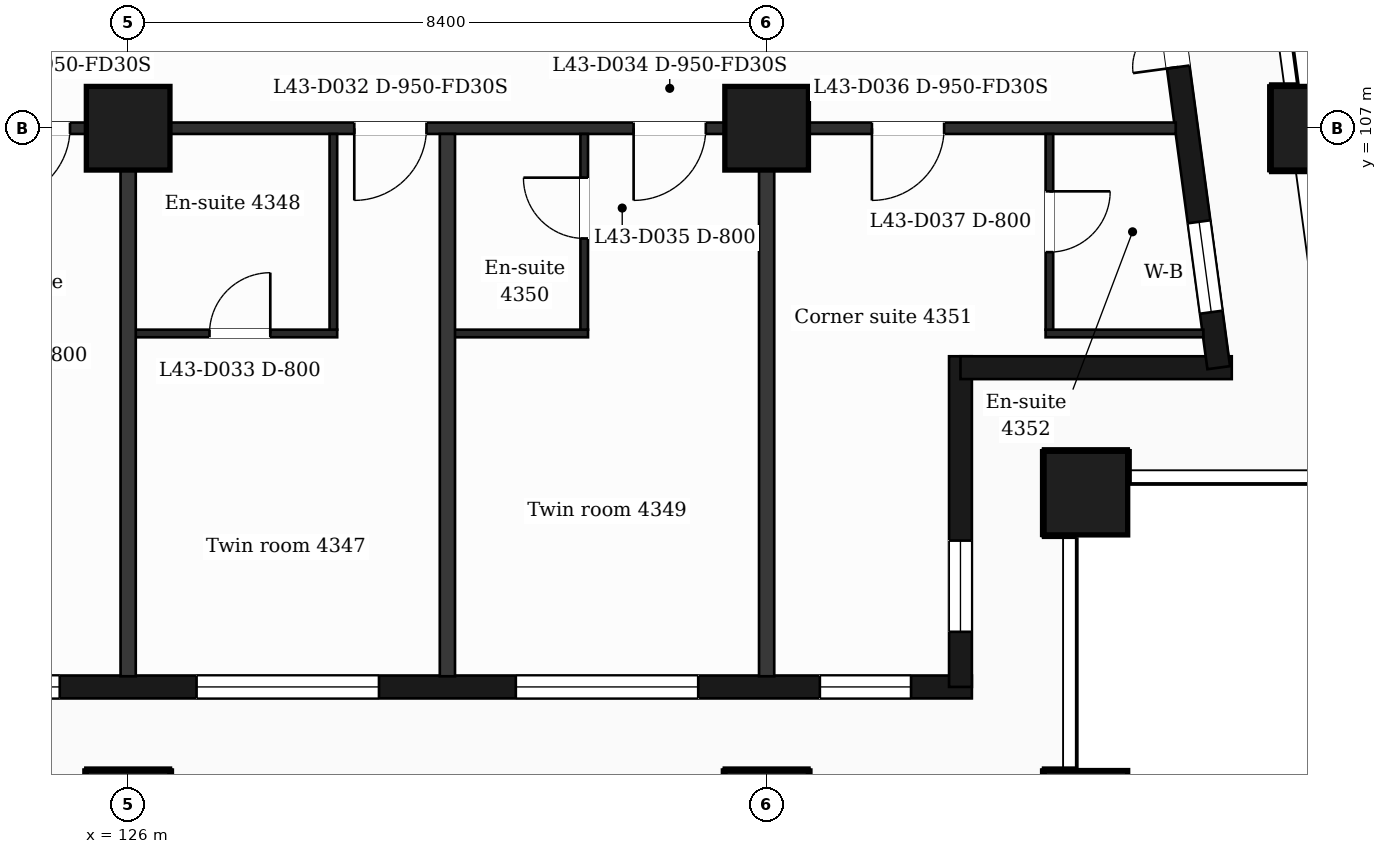
"""IFC4 building model, lengths in metres.
Left out: names, types, materials, properties, quantities, classifications, styles, units other than length and angle.
Written with IfcOpenShell. Run it as: python <this file> out.ifc"""

import sys

from ifc_helpers import new_model, si_unit, direction, frame, frame_2d, origin, origin_2d, place, context, subcontext, project, spatial, rectangle, extrude, element, fill, save


model = new_model("IFC4")
c1 = context("Model", 3, precision=1e-05, world=origin(), true_north=direction((0.0, 1.0)))
c2 = subcontext(c1, "Body", "Model", "MODEL_VIEW")
j1 = project(units=[si_unit("LENGTHUNIT", "METRE"), si_unit("PLANEANGLEUNIT", "RADIAN")], contexts=[c1])
p1 = place(None, origin())
s1 = spatial("IfcSite", under=j1, at=p1, CompositionType="ELEMENT")
p2 = place(p1, origin())
s2 = spatial("IfcBuilding", under=s1, at=p2, CompositionType="ELEMENT")
p3 = place(p2, frame((0.0, 0.0, 181.1)))
s3 = spatial("IfcBuildingStorey", under=s2, at=p3, CompositionType="ELEMENT", Elevation=181.1)
for number, where, z_axis, x_axis in (
    (1, (126.0, 98.0, 0.0), (0.0, 0.0, 1.0), (1.0, 0.0, 0.0)),
    (2, (134.4, 98.0, 0.0), (0.0, 0.0, 1.0), (1.0, 0.0, 0.0)),
    (3, (138.6, 98.0, 0.0), (0.0, 0.0, 1.0), (1.0, 0.0, 0.0)),
    (4, (138.6, 102.2, 0.0), (0.0, 0.0, 1.0), (1.0, 0.0, 0.0)),
    (5, (126.0, 107.0, 0.0), (0.0, 0.0, 1.0), (1.0, 0.0, 0.0)),
    (6, (134.4, 107.0, 0.0), (0.0, 0.0, 1.0), (1.0, 0.0, 0.0)),
    (7, (141.588, 107.0, 0.0), (0.0, 0.0, 1.0), (1.0, 0.0, 0.0)),
):
    element("IfcColumn", number, at=place(p3, frame(where, z_axis=z_axis, x_axis=x_axis)), inside=s3, PredefinedType="COLUMN", context=c2, shape_type="SweptSolid", body=[
        extrude(rectangle(XDim=1.1, YDim=1.1, at=origin_2d()), origin(), (0.0, 0.0, 1.0), 3.7),
    ])
p4 = place(p3, frame((89.85, 99.65, 0.0), z_axis=(0.0, 0.0, 1.0), x_axis=(1.0, 0.0, 0.0)))
e8 = element("IfcWall", 8, at=p4, inside=s3, PredefinedType="SOLIDWALL", context=c2, shape_type="SweptSolid", body=[
    extrude(rectangle(XDim=47.25, YDim=0.3, at=frame_2d((23.625, 0.0))), origin(), (0.0, 0.0, 1.0), 3.38),
])
p5 = place(p4, frame((0.725, 0.0, 0.9)))
e9 = element("IfcOpeningElement", 9, at=p5, cuts=e8, PredefinedType="OPENING", context=c2, shape_type="SweptSolid", body=[
    extrude(rectangle(XDim=1.2, YDim=2.1, at=frame_2d((0.6, 1.05))), frame((0.0, 0.16, 0.0), z_axis=(0.0, -1.0, 0.0), x_axis=(1.0, 0.0, 0.0)), (0.0, 0.0, 1.0), 0.32),
])
p6 = place(p4, frame((3.45, 0.0, 0.9)))
e10 = element("IfcOpeningElement", 10, at=p6, cuts=e8, PredefinedType="OPENING", context=c2, shape_type="SweptSolid", body=[
    extrude(rectangle(XDim=2.4, YDim=2.1, at=frame_2d((1.2, 1.05))), frame((0.0, 0.16, 0.0), z_axis=(0.0, -1.0, 0.0), x_axis=(1.0, 0.0, 0.0)), (0.0, 0.0, 1.0), 0.32),
])
p7 = place(p4, frame((7.35, 0.0, 0.0)))
e11 = element("IfcOpeningElement", 11, at=p7, cuts=e8, PredefinedType="OPENING", context=c2, shape_type="SweptSolid", body=[
    extrude(rectangle(XDim=1.2, YDim=2.4, at=frame_2d((0.6, 1.2))), frame((0.0, 0.16, 0.0), z_axis=(0.0, -1.0, 0.0), x_axis=(1.0, 0.0, 0.0)), (0.0, 0.0, 1.0), 0.32),
])
p8 = place(p4, frame((9.15, 0.0, 0.9)))
e12 = element("IfcOpeningElement", 12, at=p8, cuts=e8, PredefinedType="OPENING", context=c2, shape_type="SweptSolid", body=[
    extrude(rectangle(XDim=1.2, YDim=2.1, at=frame_2d((0.6, 1.05))), frame((0.0, 0.16, 0.0), z_axis=(0.0, -1.0, 0.0), x_axis=(1.0, 0.0, 0.0)), (0.0, 0.0, 1.0), 0.32),
])
p9 = place(p4, frame((11.85, 0.0, 0.9)))
e13 = element("IfcOpeningElement", 13, at=p9, cuts=e8, PredefinedType="OPENING", context=c2, shape_type="SweptSolid", body=[
    extrude(rectangle(XDim=2.4, YDim=2.1, at=frame_2d((1.2, 1.05))), frame((0.0, 0.16, 0.0), z_axis=(0.0, -1.0, 0.0), x_axis=(1.0, 0.0, 0.0)), (0.0, 0.0, 1.0), 0.32),
])
p10 = place(p4, frame((16.05, 0.0, 0.9)))
e14 = element("IfcOpeningElement", 14, at=p10, cuts=e8, PredefinedType="OPENING", context=c2, shape_type="SweptSolid", body=[
    extrude(rectangle(XDim=2.4, YDim=2.1, at=frame_2d((1.2, 1.05))), frame((0.0, 0.16, 0.0), z_axis=(0.0, -1.0, 0.0), x_axis=(1.0, 0.0, 0.0)), (0.0, 0.0, 1.0), 0.32),
])
p11 = place(p4, frame((20.85, 0.0, 0.9)))
e15 = element("IfcOpeningElement", 15, at=p11, cuts=e8, PredefinedType="OPENING", context=c2, shape_type="SweptSolid", body=[
    extrude(rectangle(XDim=1.2, YDim=2.1, at=frame_2d((0.6, 1.05))), frame((0.0, 0.16, 0.0), z_axis=(0.0, -1.0, 0.0), x_axis=(1.0, 0.0, 0.0)), (0.0, 0.0, 1.0), 0.32),
])
p12 = place(p4, frame((25.05, 0.0, 0.9)))
e16 = element("IfcOpeningElement", 16, at=p12, cuts=e8, PredefinedType="OPENING", context=c2, shape_type="SweptSolid", body=[
    extrude(rectangle(XDim=1.2, YDim=2.1, at=frame_2d((0.6, 1.05))), frame((0.0, 0.16, 0.0), z_axis=(0.0, -1.0, 0.0), x_axis=(1.0, 0.0, 0.0)), (0.0, 0.0, 1.0), 0.32),
])
p13 = place(p4, frame((28.65, 0.0, 0.9)))
e17 = element("IfcOpeningElement", 17, at=p13, cuts=e8, PredefinedType="OPENING", context=c2, shape_type="SweptSolid", body=[
    extrude(rectangle(XDim=2.4, YDim=2.1, at=frame_2d((1.2, 1.05))), frame((0.0, 0.16, 0.0), z_axis=(0.0, -1.0, 0.0), x_axis=(1.0, 0.0, 0.0)), (0.0, 0.0, 1.0), 0.32),
])
p14 = place(p4, frame((32.85, 0.0, 0.9)))
e18 = element("IfcOpeningElement", 18, at=p14, cuts=e8, PredefinedType="OPENING", context=c2, shape_type="SweptSolid", body=[
    extrude(rectangle(XDim=2.4, YDim=2.1, at=frame_2d((1.2, 1.05))), frame((0.0, 0.16, 0.0), z_axis=(0.0, -1.0, 0.0), x_axis=(1.0, 0.0, 0.0)), (0.0, 0.0, 1.0), 0.32),
])
p15 = place(p4, frame((37.05, 0.0, 0.9)))
e19 = element("IfcOpeningElement", 19, at=p15, cuts=e8, PredefinedType="OPENING", context=c2, shape_type="SweptSolid", body=[
    extrude(rectangle(XDim=2.4, YDim=2.1, at=frame_2d((1.2, 1.05))), frame((0.0, 0.16, 0.0), z_axis=(0.0, -1.0, 0.0), x_axis=(1.0, 0.0, 0.0)), (0.0, 0.0, 1.0), 0.32),
])
p16 = place(p4, frame((41.25, 0.0, 0.9)))
e20 = element("IfcOpeningElement", 20, at=p16, cuts=e8, PredefinedType="OPENING", context=c2, shape_type="SweptSolid", body=[
    extrude(rectangle(XDim=2.4, YDim=2.1, at=frame_2d((1.2, 1.05))), frame((0.0, 0.16, 0.0), z_axis=(0.0, -1.0, 0.0), x_axis=(1.0, 0.0, 0.0)), (0.0, 0.0, 1.0), 0.32),
])
p17 = place(p4, frame((45.25, 0.0, 0.9)))
e21 = element("IfcOpeningElement", 21, at=p17, cuts=e8, PredefinedType="OPENING", context=c2, shape_type="SweptSolid", body=[
    extrude(rectangle(XDim=1.2, YDim=2.1, at=frame_2d((0.6, 1.05))), frame((0.0, 0.16, 0.0), z_axis=(0.0, -1.0, 0.0), x_axis=(1.0, 0.0, 0.0)), (0.0, 0.0, 1.0), 0.32),
])
p18 = place(p3, frame((136.95, 99.65, 0.0), z_axis=(0.0, 0.0, 1.0), x_axis=(0.0, 1.0, 0.0)))
e22 = element("IfcWall", 22, at=p18, inside=s3, PredefinedType="SOLIDWALL", context=c2, shape_type="SweptSolid", body=[
    extrude(rectangle(XDim=4.35, YDim=0.3, at=frame_2d((2.175, 0.0))), origin(), (0.0, 0.0, 1.0), 3.38),
])
p19 = place(p18, frame((0.725, 0.0, 0.9)))
e23 = element("IfcOpeningElement", 23, at=p19, cuts=e22, PredefinedType="OPENING", context=c2, shape_type="SweptSolid", body=[
    extrude(rectangle(XDim=1.2, YDim=2.1, at=frame_2d((0.6, 1.05))), frame((0.0, 0.16, 0.0), z_axis=(0.0, -1.0, 0.0), x_axis=(1.0, 0.0, 0.0)), (0.0, 0.0, 1.0), 0.32),
])
p20 = place(p3, frame((136.95, 103.85, 0.0), z_axis=(0.0, 0.0, 1.0), x_axis=(1.0, 0.0, 0.0)))
e24 = element("IfcWall", 24, at=p20, inside=s3, PredefinedType="SOLIDWALL", context=c2, shape_type="SweptSolid", body=[
    extrude(rectangle(XDim=3.569, YDim=0.3, at=frame_2d((1.785, 0.0))), origin(), (0.0, 0.0, 1.0), 3.38),
])
p21 = place(p3, frame((140.348, 103.85, 0.0), z_axis=(0.0, 0.0, 1.0), x_axis=(-0.133431549479, 0.991058031401, 0.0)))
e25 = element("IfcWall", 25, at=p21, inside=s3, PredefinedType="SOLIDWALL", context=c2, shape_type="SweptSolid", body=[
    extrude(rectangle(XDim=6.609, YDim=0.3, at=frame_2d((3.304, 0.0))), origin(), (0.0, 0.0, 1.0), 3.38),
])
p22 = place(p21, frame((0.737, 0.0, 0.9)))
e26 = element("IfcOpeningElement", 26, at=p22, cuts=e25, PredefinedType="OPENING", context=c2, shape_type="SweptSolid", body=[
    extrude(rectangle(XDim=1.2, YDim=2.1, at=frame_2d((0.6, 1.05))), frame((0.0, 0.16, 0.0), z_axis=(0.0, -1.0, 0.0), x_axis=(1.0, 0.0, 0.0)), (0.0, 0.0, 1.0), 0.32),
])
p23 = place(p21, frame((3.991, 0.0, 0.0)))
e27 = element("IfcOpeningElement", 27, at=p23, cuts=e25, PredefinedType="OPENING", context=c2, shape_type="SweptSolid", body=[
    extrude(rectangle(XDim=1.2, YDim=2.4, at=frame_2d((0.6, 1.2))), frame((0.0, 0.16, 0.0), z_axis=(0.0, -1.0, 0.0), x_axis=(1.0, 0.0, 0.0)), (0.0, 0.0, 1.0), 0.32),
])
p24 = place(p3, frame((126.0, 104.3, 0.0), z_axis=(0.0, 0.0, 1.0), x_axis=(1.0, 0.0, 0.0)))
e28 = element("IfcWall", 28, at=p24, inside=s3, PredefinedType="PARTITIONING", context=c2, shape_type="SweptSolid", body=[
    extrude(rectangle(XDim=2.75, YDim=0.1, at=frame_2d((1.375, 0.0))), origin(), (0.0, 0.0, 1.0), 3.38),
])
p25 = place(p24, frame((1.07, 0.0, 0.0)))
e29 = element("IfcOpeningElement", 29, at=p25, cuts=e28, PredefinedType="OPENING", context=c2, shape_type="SweptSolid", body=[
    extrude(rectangle(XDim=0.8, YDim=2.1, at=frame_2d((0.4, 1.05))), frame((0.0, 0.06, 0.0), z_axis=(0.0, -1.0, 0.0), x_axis=(1.0, 0.0, 0.0)), (0.0, 0.0, 1.0), 0.12),
])
p26 = place(p3, frame((130.2, 104.3, 0.0), z_axis=(0.0, 0.0, 1.0), x_axis=(1.0, 0.0, 0.0)))
e30 = element("IfcWall", 30, at=p26, inside=s3, PredefinedType="PARTITIONING", context=c2, shape_type="SweptSolid", body=[
    extrude(rectangle(XDim=1.85, YDim=0.1, at=frame_2d((0.925, 0.0))), origin(), (0.0, 0.0, 1.0), 3.38),
])
p27 = place(p3, frame((138.07, 104.3, 0.0), z_axis=(0.0, 0.0, 1.0), x_axis=(1.0, 0.0, 0.0)))
e31 = element("IfcWall", 31, at=p27, inside=s3, PredefinedType="PARTITIONING", context=c2, shape_type="SweptSolid", body=[
    extrude(rectangle(XDim=2.076, YDim=0.1, at=frame_2d((1.038, 0.0))), origin(), (0.0, 0.0, 1.0), 3.38),
])
p28 = place(p3, frame((87.018, 107.0, 0.0), z_axis=(0.0, 0.0, 1.0), x_axis=(1.0, 0.0, 0.0)))
e32 = element("IfcWall", 32, at=p28, inside=s3, PredefinedType="PARTITIONING", context=c2, shape_type="SweptSolid", body=[
    extrude(rectangle(XDim=52.765, YDim=0.15, at=frame_2d((26.382, 0.0))), origin(), (0.0, 0.0, 1.0), 3.38),
])
p29 = place(p28, frame((1.276, 0.0, 0.0)))
e33 = element("IfcOpeningElement", 33, at=p29, cuts=e32, PredefinedType="OPENING", context=c2, shape_type="SweptSolid", body=[
    extrude(rectangle(XDim=0.95, YDim=2.1, at=frame_2d((0.475, 1.05))), frame((0.0, 0.085, 0.0), z_axis=(0.0, -1.0, 0.0), x_axis=(1.0, 0.0, 0.0)), (0.0, 0.0, 1.0), 0.17),
])
p30 = place(p28, frame((8.357, 0.0, 0.0)))
e34 = element("IfcOpeningElement", 34, at=p30, cuts=e32, PredefinedType="OPENING", context=c2, shape_type="SweptSolid", body=[
    extrude(rectangle(XDim=0.95, YDim=2.1, at=frame_2d((0.475, 1.05))), frame((0.0, 0.085, 0.0), z_axis=(0.0, -1.0, 0.0), x_axis=(1.0, 0.0, 0.0)), (0.0, 0.0, 1.0), 0.17),
])
p31 = place(p28, frame((9.832, 0.0, 0.0)))
e35 = element("IfcOpeningElement", 35, at=p31, cuts=e32, PredefinedType="OPENING", context=c2, shape_type="SweptSolid", body=[
    extrude(rectangle(XDim=1.0, YDim=2.1, at=frame_2d((0.5, 1.05))), frame((0.0, 0.085, 0.0), z_axis=(0.0, -1.0, 0.0), x_axis=(1.0, 0.0, 0.0)), (0.0, 0.0, 1.0), 0.17),
])
p32 = place(p28, frame((14.547, 0.0, 0.0)))
e36 = element("IfcOpeningElement", 36, at=p32, cuts=e32, PredefinedType="OPENING", context=c2, shape_type="SweptSolid", body=[
    extrude(rectangle(XDim=0.95, YDim=2.1, at=frame_2d((0.475, 1.05))), frame((0.0, 0.085, 0.0), z_axis=(0.0, -1.0, 0.0), x_axis=(1.0, 0.0, 0.0)), (0.0, 0.0, 1.0), 0.17),
])
p33 = place(p28, frame((18.257, 0.0, 0.0)))
e37 = element("IfcOpeningElement", 37, at=p33, cuts=e32, PredefinedType="OPENING", context=c2, shape_type="SweptSolid", body=[
    extrude(rectangle(XDim=0.95, YDim=2.1, at=frame_2d((0.475, 1.05))), frame((0.0, 0.085, 0.0), z_axis=(0.0, -1.0, 0.0), x_axis=(1.0, 0.0, 0.0)), (0.0, 0.0, 1.0), 0.17),
])
p34 = place(p28, frame((25.212, 0.0, 0.0)))
e38 = element("IfcOpeningElement", 38, at=p34, cuts=e32, PredefinedType="OPENING", context=c2, shape_type="SweptSolid", body=[
    extrude(rectangle(XDim=1.0, YDim=2.1, at=frame_2d((0.5, 1.05))), frame((0.0, 0.085, 0.0), z_axis=(0.0, -1.0, 0.0), x_axis=(1.0, 0.0, 0.0)), (0.0, 0.0, 1.0), 0.17),
])
p35 = place(p28, frame((37.267, 0.0, 0.0)))
e39 = element("IfcOpeningElement", 39, at=p35, cuts=e32, PredefinedType="OPENING", context=c2, shape_type="SweptSolid", body=[
    extrude(rectangle(XDim=0.95, YDim=2.1, at=frame_2d((0.475, 1.05))), frame((0.0, 0.085, 0.0), z_axis=(0.0, -1.0, 0.0), x_axis=(1.0, 0.0, 0.0)), (0.0, 0.0, 1.0), 0.17),
])
p36 = place(p28, frame((41.957, 0.0, 0.0)))
e40 = element("IfcOpeningElement", 40, at=p36, cuts=e32, PredefinedType="OPENING", context=c2, shape_type="SweptSolid", body=[
    extrude(rectangle(XDim=0.95, YDim=2.1, at=frame_2d((0.475, 1.05))), frame((0.0, 0.085, 0.0), z_axis=(0.0, -1.0, 0.0), x_axis=(1.0, 0.0, 0.0)), (0.0, 0.0, 1.0), 0.17),
])
p37 = place(p28, frame((45.632, 0.0, 0.0)))
e41 = element("IfcOpeningElement", 41, at=p37, cuts=e32, PredefinedType="OPENING", context=c2, shape_type="SweptSolid", body=[
    extrude(rectangle(XDim=0.95, YDim=2.1, at=frame_2d((0.475, 1.05))), frame((0.0, 0.085, 0.0), z_axis=(0.0, -1.0, 0.0), x_axis=(1.0, 0.0, 0.0)), (0.0, 0.0, 1.0), 0.17),
])
p38 = place(p28, frame((48.767, 0.0, 0.0)))
e42 = element("IfcOpeningElement", 42, at=p38, cuts=e32, PredefinedType="OPENING", context=c2, shape_type="SweptSolid", body=[
    extrude(rectangle(XDim=0.95, YDim=2.1, at=frame_2d((0.475, 1.05))), frame((0.0, 0.085, 0.0), z_axis=(0.0, -1.0, 0.0), x_axis=(1.0, 0.0, 0.0)), (0.0, 0.0, 1.0), 0.17),
])
p39 = place(p3, frame((126.0, 99.79, 0.0), z_axis=(0.0, 0.0, 1.0), x_axis=(0.0, 1.0, 0.0)))
e43 = element("IfcWall", 43, at=p39, inside=s3, PredefinedType="PARTITIONING", context=c2, shape_type="SweptSolid", body=[
    extrude(rectangle(XDim=7.135, YDim=0.2, at=frame_2d((3.567, 0.0))), origin(), (0.0, 0.0, 1.0), 3.38),
])
p40 = place(p3, frame((128.7, 104.35, 0.0), z_axis=(0.0, 0.0, 1.0), x_axis=(0.0, 1.0, 0.0)))
e44 = element("IfcWall", 44, at=p40, inside=s3, PredefinedType="PARTITIONING", context=c2, shape_type="SweptSolid", body=[
    extrude(rectangle(XDim=2.575, YDim=0.1, at=frame_2d((1.288, 0.0))), origin(), (0.0, 0.0, 1.0), 3.38),
])
p41 = place(p3, frame((130.2, 99.79, 0.0), z_axis=(0.0, 0.0, 1.0), x_axis=(0.0, 1.0, 0.0)))
e45 = element("IfcWall", 45, at=p41, inside=s3, PredefinedType="PARTITIONING", context=c2, shape_type="SweptSolid", body=[
    extrude(rectangle(XDim=7.135, YDim=0.2, at=frame_2d((3.567, 0.0))), origin(), (0.0, 0.0, 1.0), 3.38),
])
p42 = place(p3, frame((132.0, 104.35, 0.0), z_axis=(0.0, 0.0, 1.0), x_axis=(0.0, 1.0, 0.0)))
e46 = element("IfcWall", 46, at=p42, inside=s3, PredefinedType="PARTITIONING", context=c2, shape_type="SweptSolid", body=[
    extrude(rectangle(XDim=2.575, YDim=0.1, at=frame_2d((1.288, 0.0))), origin(), (0.0, 0.0, 1.0), 3.38),
])
p43 = place(p42, frame((1.2, 0.0, 0.0)))
e47 = element("IfcOpeningElement", 47, at=p43, cuts=e46, PredefinedType="OPENING", context=c2, shape_type="SweptSolid", body=[
    extrude(rectangle(XDim=0.8, YDim=2.1, at=frame_2d((0.4, 1.05))), frame((0.0, 0.06, 0.0), z_axis=(0.0, -1.0, 0.0), x_axis=(1.0, 0.0, 0.0)), (0.0, 0.0, 1.0), 0.12),
])
p44 = place(p3, frame((134.4, 99.79, 0.0), z_axis=(0.0, 0.0, 1.0), x_axis=(0.0, 1.0, 0.0)))
e48 = element("IfcWall", 48, at=p44, inside=s3, PredefinedType="PARTITIONING", context=c2, shape_type="SweptSolid", body=[
    extrude(rectangle(XDim=7.135, YDim=0.2, at=frame_2d((3.567, 0.0))), origin(), (0.0, 0.0, 1.0), 3.38),
])
p45 = place(p3, frame((138.12, 104.35, 0.0), z_axis=(0.0, 0.0, 1.0), x_axis=(0.0, 1.0, 0.0)))
e49 = element("IfcWall", 49, at=p45, inside=s3, PredefinedType="PARTITIONING", context=c2, shape_type="SweptSolid", body=[
    extrude(rectangle(XDim=2.575, YDim=0.1, at=frame_2d((1.288, 0.0))), origin(), (0.0, 0.0, 1.0), 3.38),
])
p46 = place(p45, frame((1.02, 0.0, 0.0)))
e50 = element("IfcOpeningElement", 50, at=p46, cuts=e49, PredefinedType="OPENING", context=c2, shape_type="SweptSolid", body=[
    extrude(rectangle(XDim=0.8, YDim=2.1, at=frame_2d((0.4, 1.05))), frame((0.0, 0.06, 0.0), z_axis=(0.0, -1.0, 0.0), x_axis=(1.0, 0.0, 0.0)), (0.0, 0.0, 1.0), 0.12),
])
p47 = place(p14, origin())
e51 = element("IfcWindow", 51, at=p47, inside=s3, PartitioningType="SINGLE_PANEL", PredefinedType="WINDOW", context=c2, shape_type="SweptSolid", body=[
    extrude(rectangle(XDim=2.4, YDim=2.1, at=frame_2d((1.2, 1.05))), frame((0.0, 0.03, 0.0), z_axis=(0.0, -1.0, 0.0), x_axis=(1.0, 0.0, 0.0)), (0.0, 0.0, 1.0), 0.06),
])
fill(e18, e51)
p48 = place(p15, origin())
e52 = element("IfcWindow", 52, at=p48, inside=s3, PartitioningType="SINGLE_PANEL", PredefinedType="WINDOW", context=c2, shape_type="SweptSolid", body=[
    extrude(rectangle(XDim=2.4, YDim=2.1, at=frame_2d((1.2, 1.05))), frame((0.0, 0.03, 0.0), z_axis=(0.0, -1.0, 0.0), x_axis=(1.0, 0.0, 0.0)), (0.0, 0.0, 1.0), 0.06),
])
fill(e19, e52)
p49 = place(p16, origin())
e53 = element("IfcWindow", 53, at=p49, inside=s3, PartitioningType="SINGLE_PANEL", PredefinedType="WINDOW", context=c2, shape_type="SweptSolid", body=[
    extrude(rectangle(XDim=2.4, YDim=2.1, at=frame_2d((1.2, 1.05))), frame((0.0, 0.03, 0.0), z_axis=(0.0, -1.0, 0.0), x_axis=(1.0, 0.0, 0.0)), (0.0, 0.0, 1.0), 0.06),
])
fill(e20, e53)
p50 = place(p17, origin())
e54 = element("IfcWindow", 54, at=p50, inside=s3, PartitioningType="SINGLE_PANEL", PredefinedType="WINDOW", context=c2, shape_type="SweptSolid", body=[
    extrude(rectangle(XDim=1.2, YDim=2.1, at=frame_2d((0.6, 1.05))), frame((0.0, 0.03, 0.0), z_axis=(0.0, -1.0, 0.0), x_axis=(1.0, 0.0, 0.0)), (0.0, 0.0, 1.0), 0.06),
])
fill(e21, e54)
p51 = place(p19, origin())
e55 = element("IfcWindow", 55, at=p51, inside=s3, PartitioningType="SINGLE_PANEL", PredefinedType="WINDOW", context=c2, shape_type="SweptSolid", body=[
    extrude(rectangle(XDim=1.2, YDim=2.1, at=frame_2d((0.6, 1.05))), frame((0.0, 0.03, 0.0), z_axis=(0.0, -1.0, 0.0), x_axis=(1.0, 0.0, 0.0)), (0.0, 0.0, 1.0), 0.06),
])
fill(e23, e55)
p52 = place(p22, origin())
e56 = element("IfcWindow", 56, at=p52, inside=s3, PartitioningType="SINGLE_PANEL", PredefinedType="WINDOW", context=c2, shape_type="SweptSolid", body=[
    extrude(rectangle(XDim=1.2, YDim=2.1, at=frame_2d((0.6, 1.05))), frame((0.0, 0.03, 0.0), z_axis=(0.0, -1.0, 0.0), x_axis=(1.0, 0.0, 0.0)), (0.0, 0.0, 1.0), 0.06),
])
fill(e26, e56)
p53 = place(p23, origin())
e57 = element("IfcDoor", 57, at=p53, inside=s3, OperationType="DOUBLE_DOOR_SINGLE_SWING", PredefinedType="DOOR", context=c2, shape_type="SweptSolid", body=[
    extrude(rectangle(XDim=1.2, YDim=2.4, at=frame_2d((0.6, 1.2))), frame((0.0, 0.025, 0.0), z_axis=(0.0, -1.0, 0.0), x_axis=(1.0, 0.0, 0.0)), (0.0, 0.0, 1.0), 0.05),
])
fill(e27, e57)
p54 = place(p35, origin())
e58 = element("IfcDoor", 58, at=p54, inside=s3, OperationType="SINGLE_SWING_LEFT", PredefinedType="DOOR", context=c2, shape_type="SweptSolid", body=[
    extrude(rectangle(XDim=0.95, YDim=2.1, at=frame_2d((0.475, 1.05))), frame((0.0, 0.025, 0.0), z_axis=(0.0, -1.0, 0.0), x_axis=(1.0, 0.0, 0.0)), (0.0, 0.0, 1.0), 0.05),
])
fill(e39, e58)
p55 = place(p36, origin())
e59 = element("IfcDoor", 59, at=p55, inside=s3, OperationType="SINGLE_SWING_LEFT", PredefinedType="DOOR", context=c2, shape_type="SweptSolid", body=[
    extrude(rectangle(XDim=0.95, YDim=2.1, at=frame_2d((0.475, 1.05))), frame((0.0, 0.025, 0.0), z_axis=(0.0, -1.0, 0.0), x_axis=(1.0, 0.0, 0.0)), (0.0, 0.0, 1.0), 0.05),
])
fill(e40, e59)
p56 = place(p25, origin())
e60 = element("IfcDoor", 60, at=p56, inside=s3, OperationType="SINGLE_SWING_RIGHT", PredefinedType="DOOR", context=c2, shape_type="SweptSolid", body=[
    extrude(rectangle(XDim=0.8, YDim=2.1, at=frame_2d((0.4, 1.05))), frame((0.0, 0.025, 0.0), z_axis=(0.0, -1.0, 0.0), x_axis=(1.0, 0.0, 0.0)), (0.0, 0.0, 1.0), 0.05),
])
fill(e29, e60)
p57 = place(p37, origin())
e61 = element("IfcDoor", 61, at=p57, inside=s3, OperationType="SINGLE_SWING_LEFT", PredefinedType="DOOR", context=c2, shape_type="SweptSolid", body=[
    extrude(rectangle(XDim=0.95, YDim=2.1, at=frame_2d((0.475, 1.05))), frame((0.0, 0.025, 0.0), z_axis=(0.0, -1.0, 0.0), x_axis=(1.0, 0.0, 0.0)), (0.0, 0.0, 1.0), 0.05),
])
fill(e41, e61)
p58 = place(p43, origin())
e62 = element("IfcDoor", 62, at=p58, inside=s3, OperationType="SINGLE_SWING_RIGHT", PredefinedType="DOOR", context=c2, shape_type="SweptSolid", body=[
    extrude(rectangle(XDim=0.8, YDim=2.1, at=frame_2d((0.4, 1.05))), frame((0.0, 0.025, 0.0), z_axis=(0.0, -1.0, 0.0), x_axis=(1.0, 0.0, 0.0)), (0.0, 0.0, 1.0), 0.05),
])
fill(e47, e62)
p59 = place(p38, origin())
e63 = element("IfcDoor", 63, at=p59, inside=s3, OperationType="SINGLE_SWING_LEFT", PredefinedType="DOOR", context=c2, shape_type="SweptSolid", body=[
    extrude(rectangle(XDim=0.95, YDim=2.1, at=frame_2d((0.475, 1.05))), frame((0.0, 0.025, 0.0), z_axis=(0.0, -1.0, 0.0), x_axis=(1.0, 0.0, 0.0)), (0.0, 0.0, 1.0), 0.05),
])
fill(e42, e63)
p60 = place(p46, origin())
e64 = element("IfcDoor", 64, at=p60, inside=s3, OperationType="SINGLE_SWING_RIGHT", PredefinedType="DOOR", context=c2, shape_type="SweptSolid", body=[
    extrude(rectangle(XDim=0.8, YDim=2.1, at=frame_2d((0.4, 1.05))), frame((0.0, 0.025, 0.0), z_axis=(0.0, -1.0, 0.0), x_axis=(1.0, 0.0, 0.0)), (0.0, 0.0, 1.0), 0.05),
])
fill(e50, e64)
save(model, sys.argv[1])
